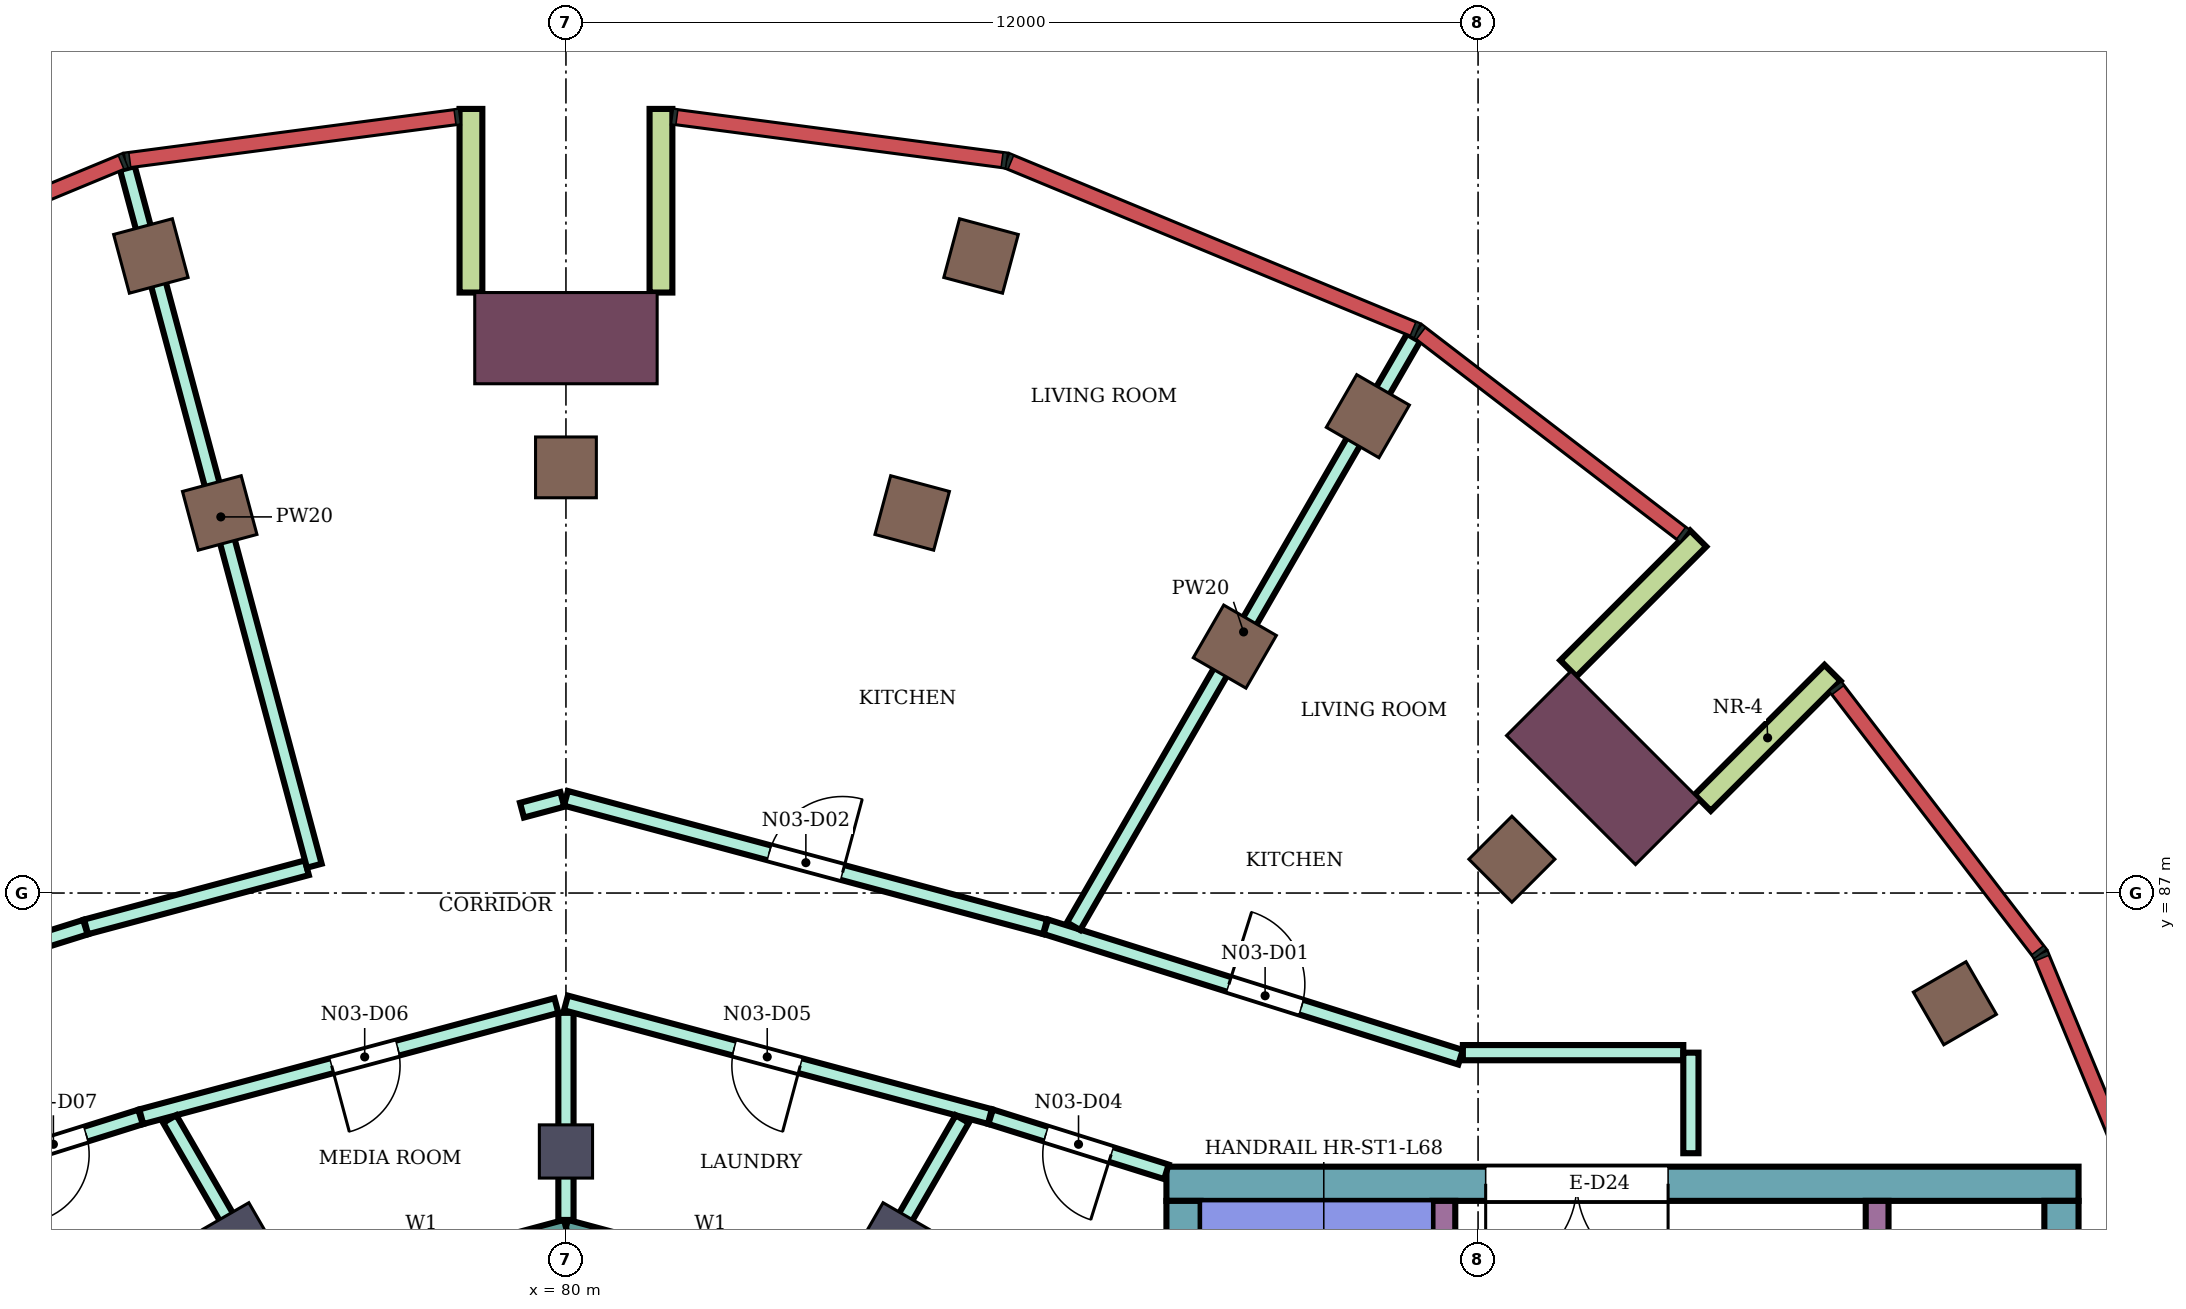
"""IFC4 building model, lengths in metres.
Left out: names, types, materials, properties, quantities, classifications, styles, units other than length and angle.
Written with IfcOpenShell. Run it as: python <this file> out.ifc"""

import sys

from ifc_helpers import new_model, si_unit, direction, frame, frame_2d, origin, origin_2d, place, context, subcontext, project, spatial, rectangle, extrude, element, fill, save


model = new_model("IFC4")
c1 = context("Model", 3, precision=1e-05, world=origin(), true_north=direction((0.0, 1.0)))
c2 = subcontext(c1, "Body", "Model", "MODEL_VIEW")
j1 = project(units=[si_unit("LENGTHUNIT", "METRE"), si_unit("PLANEANGLEUNIT", "RADIAN")], contexts=[c1])
p1 = place(None, origin())
s1 = spatial("IfcSite", under=j1, at=p1, CompositionType="ELEMENT")
p2 = place(p1, origin())
s2 = spatial("IfcBuilding", under=s1, at=p2, CompositionType="ELEMENT")
p3 = place(p2, frame((0.0, 0.0, 296.7)))
s3 = spatial("IfcBuildingStorey", under=s2, at=p3, CompositionType="ELEMENT", Elevation=296.7)
for number, where, z_axis, x_axis in (
    (1, (98.273, 85.55, 0.0), (0.0, 0.0, 1.0), (0.866, 0.5, 0.0)),
    (2, (90.55, 93.273, 0.0), (0.0, 0.0, 1.0), (0.5, 0.866, 0.0)),
    (3, (85.461, 95.381, 0.0), (0.0, 0.0, 1.0), (0.259, 0.966, 0.0)),
    (4, (74.539, 95.381, 0.0), (0.0, 0.0, 1.0), (-0.259, 0.966, 0.0)),
    (5, (92.445, 87.445, 0.0), (0.0, 0.0, 1.0), (0.707, 0.707, 0.0)),
    (6, (88.8, 90.242, 0.0), (0.0, 0.0, 1.0), (0.5, 0.866, 0.0)),
    (7, (84.555, 92.0, 0.0), (0.0, 0.0, 1.0), (0.259, 0.966, 0.0)),
    (8, (80.0, 92.6, 0.0), (0.0, 0.0, 1.0), (0.0, 1.0, 0.0)),
    (9, (75.445, 92.0, 0.0), (0.0, 0.0, 1.0), (-0.259, 0.966, 0.0)),
):
    element("IfcColumn", number, at=place(p3, frame(where, z_axis=z_axis, x_axis=x_axis)), inside=s3, PredefinedType="COLUMN", context=c2, shape_type="SweptSolid", body=[
        extrude(rectangle(XDim=0.8, YDim=0.8, at=origin_2d()), origin(), (0.0, 0.0, 1.0), 4.2),
    ])
for number, where, z_axis, x_axis in (
    (10, (84.3, 82.448, 0.0), (0.0, 0.0, 1.0), (0.5, 0.866, 0.0)),
    (11, (80.0, 83.6, 0.0), (0.0, 0.0, 1.0), (0.0, 1.0, 0.0)),
    (12, (75.7, 82.448, 0.0), (0.0, 0.0, 1.0), (-0.5, 0.866, 0.0)),
):
    element("IfcColumn", number, at=place(p3, frame(where, z_axis=z_axis, x_axis=x_axis)), inside=s3, PredefinedType="COLUMN", context=c2, shape_type="SweptSolid", body=[
        extrude(rectangle(XDim=0.7, YDim=0.7, at=origin_2d()), origin(), (0.0, 0.0, 1.0), 4.2),
    ])
for number, where, z_axis, x_axis in (
    (13, (93.647, 88.647, 0.0), (0.0, 0.0, 1.0), (0.707, 0.707, 0.0)),
    (14, (80.0, 94.3, 0.0), (0.0, 0.0, 1.0), (0.0, 1.0, 0.0)),
):
    element("IfcColumn", number, at=place(p3, frame(where, z_axis=z_axis, x_axis=x_axis)), inside=s3, PredefinedType="COLUMN", context=c2, shape_type="SweptSolid", body=[
        extrude(rectangle(XDim=1.2, YDim=2.4, at=origin_2d()), origin(), (0.0, 0.0, 1.0), 4.2),
    ])
p4 = place(p3, frame((87.9, 83.175, 0.0), z_axis=(0.0, 0.0, 1.0), x_axis=(1.0, 0.0, 0.0)))
e15 = element("IfcWall", 15, at=p4, inside=s3, PredefinedType="SHEAR", context=c2, shape_type="SweptSolid", body=[
    extrude(rectangle(XDim=12.0, YDim=0.45, at=frame_2d((6.0, 0.0))), origin(), (0.0, 0.0, 1.0), 3.88),
])
p5 = place(p4, frame((4.2, 0.0, 0.0)))
e16 = element("IfcOpeningElement", 16, at=p5, cuts=e15, PredefinedType="OPENING", context=c2, shape_type="SweptSolid", body=[
    extrude(rectangle(XDim=2.4, YDim=2.4, at=frame_2d((1.2, 1.2))), frame((0.0, 0.235, 0.0), z_axis=(0.0, -1.0, 0.0), x_axis=(1.0, 0.0, 0.0)), (0.0, 0.0, 1.0), 0.47),
])
p6 = place(p3, frame((88.125, 75.0, 0.0), z_axis=(0.0, 0.0, 1.0), x_axis=(0.0, 1.0, 0.0)))
e17 = element("IfcWall", 17, at=p6, inside=s3, PredefinedType="SHEAR", context=c2, shape_type="SweptSolid", body=[
    extrude(rectangle(XDim=7.95, YDim=0.45, at=frame_2d((3.975, 0.0))), origin(), (0.0, 0.0, 1.0), 3.88),
])
p7 = place(p3, frame((99.675, 73.6, 0.0), z_axis=(0.0, 0.0, 1.0), x_axis=(0.0, 1.0, 0.0)))
e18 = element("IfcWall", 18, at=p7, inside=s3, PredefinedType="SHEAR", context=c2, shape_type="SweptSolid", body=[
    extrude(rectangle(XDim=9.35, YDim=0.45, at=frame_2d((4.675, 0.0))), origin(), (0.0, 0.0, 1.0), 3.88),
])
p8 = place(p3, frame((91.55, 75.0, 0.0), z_axis=(0.0, 0.0, 1.0), x_axis=(0.0, 1.0, 0.0)))
e19 = element("IfcWall", 19, at=p8, inside=s3, PredefinedType="SHEAR", context=c2, shape_type="SweptSolid", body=[
    extrude(rectangle(XDim=7.95, YDim=0.3, at=frame_2d((3.975, 0.0))), origin(), (0.0, 0.0, 1.0), 3.88),
])
p9 = place(p8, frame((1.85, 0.0, 0.0)))
e20 = element("IfcOpeningElement", 20, at=p9, cuts=e19, PredefinedType="OPENING", context=c2, shape_type="SweptSolid", body=[
    extrude(rectangle(XDim=0.9, YDim=2.1, at=frame_2d((0.45, 1.05))), frame((0.0, 0.16, 0.0), z_axis=(0.0, -1.0, 0.0), x_axis=(1.0, 0.0, 0.0)), (0.0, 0.0, 1.0), 0.32),
])
p10 = place(p3, frame((97.25, 80.05, 0.0), z_axis=(0.0, 0.0, 1.0), x_axis=(0.0, 1.0, 0.0)))
e21 = element("IfcWall", 21, at=p10, inside=s3, PredefinedType="SHEAR", context=c2, shape_type="SweptSolid", body=[
    extrude(rectangle(XDim=2.9, YDim=0.3, at=frame_2d((1.45, 0.0))), origin(), (0.0, 0.0, 1.0), 3.88),
])
for number, where, z_axis, x_axis in (
    (22, (94.955, 88.188, 0.0), (0.0, 0.0, 1.0), (0.707, 0.707, 0.0)),
    (23, (93.188, 89.955, 0.0), (0.0, 0.0, 1.0), (0.707, 0.707, 0.0)),
    (24, (81.25, 94.9, 0.0), (0.0, 0.0, 1.0), (0.0, 1.0, 0.0)),
    (25, (78.75, 94.9, 0.0), (0.0, 0.0, 1.0), (0.0, 1.0, 0.0)),
):
    element("IfcWall", number, at=place(p3, frame(where, z_axis=z_axis, x_axis=x_axis)), inside=s3, PredefinedType="NOTDEFINED", context=c2, shape_type="SweptSolid", body=[
        extrude(rectangle(XDim=2.416, YDim=0.3, at=frame_2d((1.208, 0.0))), origin(), (0.0, 0.0, 1.0), 4.2),
    ])
p11 = place(p3, frame((83.802, 81.585, 0.0), z_axis=(0.0, 0.0, 1.0), x_axis=(-0.965933654434, 0.258789828301, 0.0)))
e26 = element("IfcWall", 26, at=p11, inside=s3, PredefinedType="NOTDEFINED", context=c2, shape_type="SweptSolid", body=[
    extrude(rectangle(XDim=3.936, YDim=0.2, at=frame_2d((1.968, 0.0))), origin(), (0.0, 0.0, 1.0), 4.2),
])
p12 = place(p11, frame((0.468, 0.0, 0.9)))
e27 = element("IfcOpeningElement", 27, at=p12, cuts=e26, PredefinedType="OPENING", context=c2, shape_type="SweptSolid", body=[
    extrude(rectangle(XDim=3.0, YDim=2.3, at=frame_2d((1.5, 1.15))), frame((0.0, 0.11, 0.0), z_axis=(0.0, -1.0, 0.0), x_axis=(1.0, 0.0, 0.0)), (0.0, 0.0, 1.0), 0.22),
])
p13 = place(p3, frame((80.0, 82.604, 0.0), z_axis=(0.0, 0.0, 1.0), x_axis=(-0.965933654434, -0.258789828301, 0.0)))
e28 = element("IfcWall", 28, at=p13, inside=s3, PredefinedType="NOTDEFINED", context=c2, shape_type="SweptSolid", body=[
    extrude(rectangle(XDim=3.936, YDim=0.2, at=frame_2d((1.968, 0.0))), origin(), (0.0, 0.0, 1.0), 4.2),
])
p14 = place(p13, frame((0.468, 0.0, 0.9)))
e29 = element("IfcOpeningElement", 29, at=p14, cuts=e28, PredefinedType="OPENING", context=c2, shape_type="SweptSolid", body=[
    extrude(rectangle(XDim=3.0, YDim=2.3, at=frame_2d((1.5, 1.15))), frame((0.0, 0.11, 0.0), z_axis=(0.0, -1.0, 0.0), x_axis=(1.0, 0.0, 0.0)), (0.0, 0.0, 1.0), 0.22),
])
p15 = place(p3, frame((68.201, 84.833, 0.0), z_axis=(0.0, 0.0, 1.0), x_axis=(0.95420102455, 0.299166182492, 0.0)))
e30 = element("IfcWall", 30, at=p15, inside=s3, PredefinedType="PARTITIONING", context=c2, shape_type="SweptSolid", body=[
    extrude(rectangle(XDim=5.74, YDim=0.2, at=frame_2d((2.87, 0.0))), origin(), (0.0, 0.0, 1.0), 3.75),
])
p16 = place(p15, frame((2.374, 0.0, 0.0)))
e31 = element("IfcOpeningElement", 31, at=p16, cuts=e30, PredefinedType="OPENING", context=c2, shape_type="SweptSolid", body=[
    extrude(rectangle(XDim=1.0, YDim=2.1, at=frame_2d((0.5, 1.05))), frame((0.0, 0.11, 0.0), z_axis=(0.0, -1.0, 0.0), x_axis=(1.0, 0.0, 0.0)), (0.0, 0.0, 1.0), 0.22),
])
p17 = place(p3, frame((72.1, 83.332, 0.0), z_axis=(0.0, 0.0, 1.0), x_axis=(0.954233106619, 0.299063836383, 0.0)))
e32 = element("IfcWall", 32, at=p17, inside=s3, PredefinedType="PARTITIONING", context=c2, shape_type="SweptSolid", body=[
    extrude(rectangle(XDim=2.414, YDim=0.2, at=frame_2d((1.207, 0.0))), origin(), (0.0, 0.0, 1.0), 3.75),
])
p18 = place(p17, frame((0.762, 0.0, 0.0)))
e33 = element("IfcOpeningElement", 33, at=p18, cuts=e32, PredefinedType="OPENING", context=c2, shape_type="SweptSolid", body=[
    extrude(rectangle(XDim=0.9, YDim=2.1, at=frame_2d((0.45, 1.05))), frame((0.0, 0.11, 0.0), z_axis=(0.0, -1.0, 0.0), x_axis=(1.0, 0.0, 0.0)), (0.0, 0.0, 1.0), 0.22),
])
p19 = place(p3, frame((73.687, 86.555, 0.0), z_axis=(0.0, 0.0, 1.0), x_axis=(0.965987897826, 0.258587279759, 0.0)))
e34 = element("IfcWall", 34, at=p19, inside=s3, PredefinedType="PARTITIONING", context=c2, shape_type="SweptSolid", body=[
    extrude(rectangle(XDim=3.007, YDim=0.2, at=frame_2d((1.503, 0.0))), origin(), (0.0, 0.0, 1.0), 3.75),
])
p20 = place(p3, frame((74.23, 96.538, 0.0), z_axis=(0.0, 0.0, 1.0), x_axis=(0.258775468547, -0.965937501538, 0.0)))
e35 = element("IfcWall", 35, at=p20, inside=s3, PredefinedType="PARTITIONING", context=c2, shape_type="SweptSolid", body=[
    extrude(rectangle(XDim=9.502, YDim=0.2, at=frame_2d((4.751, 0.0))), origin(), (0.0, 0.0, 1.0), 3.75),
])
p21 = place(p3, frame((74.413, 84.057, 0.0), z_axis=(0.0, 0.0, 1.0), x_axis=(0.965972135939, 0.258646153246, 0.0)))
e36 = element("IfcWall", 36, at=p21, inside=s3, PredefinedType="PARTITIONING", context=c2, shape_type="SweptSolid", body=[
    extrude(rectangle(XDim=5.654, YDim=0.2, at=frame_2d((2.827, 0.0))), origin(), (0.0, 0.0, 1.0), 3.75),
])
p22 = place(p21, frame((2.593, 0.0, 0.0)))
e37 = element("IfcOpeningElement", 37, at=p22, cuts=e36, PredefinedType="OPENING", context=c2, shape_type="SweptSolid", body=[
    extrude(rectangle(XDim=0.9, YDim=2.1, at=frame_2d((0.45, 1.05))), frame((0.0, 0.11, 0.0), z_axis=(0.0, -1.0, 0.0), x_axis=(1.0, 0.0, 0.0)), (0.0, 0.0, 1.0), 0.22),
])
p23 = place(p3, frame((74.787, 84.027, 0.0), z_axis=(0.0, 0.0, 1.0), x_axis=(0.500079107518, -0.86597972622, 0.0)))
e38 = element("IfcWall", 38, at=p23, inside=s3, PredefinedType="PARTITIONING", context=c2, shape_type="SweptSolid", body=[
    extrude(rectangle(XDim=2.726, YDim=0.2, at=frame_2d((1.363, 0.0))), origin(), (0.0, 0.0, 1.0), 3.75),
])
p24 = place(p3, frame((79.421, 88.09, 0.0), z_axis=(0.0, 0.0, 1.0), x_axis=(0.966065016104, 0.258299021793, 0.0)))
e39 = element("IfcWall", 39, at=p24, inside=s3, PredefinedType="PARTITIONING", context=c2, shape_type="SweptSolid", body=[
    extrude(rectangle(XDim=0.549, YDim=0.2, at=frame_2d((0.274, 0.0))), origin(), (0.0, 0.0, 1.0), 3.75),
])
p25 = place(p3, frame((80.0, 82.699, 0.0), z_axis=(0.0, 0.0, 1.0), x_axis=(0.0, 1.0, 0.0)))
e40 = element("IfcWall", 40, at=p25, inside=s3, PredefinedType="PARTITIONING", context=c2, shape_type="SweptSolid", body=[
    extrude(rectangle(XDim=2.725, YDim=0.2, at=frame_2d((1.363, 0.0))), origin(), (0.0, 0.0, 1.0), 3.75),
])
p26 = place(p3, frame((80.0, 85.554, 0.0), z_axis=(0.0, 0.0, 1.0), x_axis=(0.965928989968, -0.258807237802, 0.0)))
e41 = element("IfcWall", 41, at=p26, inside=s3, PredefinedType="PARTITIONING", context=c2, shape_type="SweptSolid", body=[
    extrude(rectangle(XDim=5.774, YDim=0.2, at=frame_2d((2.887, 0.0))), origin(), (0.0, 0.0, 1.0), 3.75),
])
p27 = place(p26, frame((2.292, 0.0, 0.0)))
e42 = element("IfcOpeningElement", 42, at=p27, cuts=e41, PredefinedType="OPENING", context=c2, shape_type="SweptSolid", body=[
    extrude(rectangle(XDim=0.9, YDim=2.1, at=frame_2d((0.45, 1.05))), frame((0.0, 0.11, 0.0), z_axis=(0.0, -1.0, 0.0), x_axis=(1.0, 0.0, 0.0)), (0.0, 0.0, 1.0), 0.22),
])
p28 = place(p3, frame((80.0, 88.246, 0.0), z_axis=(0.0, 0.0, 1.0), x_axis=(0.965856994925, -0.259075790752, 0.0)))
e43 = element("IfcWall", 43, at=p28, inside=s3, PredefinedType="PARTITIONING", context=c2, shape_type="SweptSolid", body=[
    extrude(rectangle(XDim=6.526, YDim=0.2, at=frame_2d((3.263, 0.0))), origin(), (0.0, 0.0, 1.0), 3.75),
])
p29 = place(p28, frame((2.768, 0.0, 0.0)))
e44 = element("IfcOpeningElement", 44, at=p29, cuts=e43, PredefinedType="OPENING", context=c2, shape_type="SweptSolid", body=[
    extrude(rectangle(XDim=1.0, YDim=2.1, at=frame_2d((0.5, 1.05))), frame((0.0, 0.11, 0.0), z_axis=(0.0, -1.0, 0.0), x_axis=(1.0, 0.0, 0.0)), (0.0, 0.0, 1.0), 0.22),
])
p30 = place(p3, frame((83.851, 81.666, 0.0), z_axis=(0.0, 0.0, 1.0), x_axis=(0.500146274735, 0.865940935554, 0.0)))
e45 = element("IfcWall", 45, at=p30, inside=s3, PredefinedType="PARTITIONING", context=c2, shape_type="SweptSolid", body=[
    extrude(rectangle(XDim=2.726, YDim=0.2, at=frame_2d((1.363, 0.0))), origin(), (0.0, 0.0, 1.0), 3.75),
])
p31 = place(p3, frame((85.587, 84.057, 0.0), z_axis=(0.0, 0.0, 1.0), x_axis=(0.954239513179, -0.299043393987, 0.0)))
e46 = element("IfcWall", 46, at=p31, inside=s3, PredefinedType="PARTITIONING", context=c2, shape_type="SweptSolid", body=[
    extrude(rectangle(XDim=2.424, YDim=0.2, at=frame_2d((1.212, 0.0))), origin(), (0.0, 0.0, 1.0), 3.75),
])
p32 = place(p31, frame((0.762, 0.0, 0.0)))
e47 = element("IfcOpeningElement", 47, at=p32, cuts=e46, PredefinedType="OPENING", context=c2, shape_type="SweptSolid", body=[
    extrude(rectangle(XDim=0.9, YDim=2.1, at=frame_2d((0.45, 1.05))), frame((0.0, 0.11, 0.0), z_axis=(0.0, -1.0, 0.0), x_axis=(1.0, 0.0, 0.0)), (0.0, 0.0, 1.0), 0.22),
])
p33 = place(p3, frame((86.314, 86.556, 0.0), z_axis=(0.0, 0.0, 1.0), x_axis=(0.953912400139, -0.300085209334, 0.0)))
e48 = element("IfcWall", 48, at=p33, inside=s3, PredefinedType="PARTITIONING", context=c2, shape_type="SweptSolid", body=[
    extrude(rectangle(XDim=5.719, YDim=0.2, at=frame_2d((2.86, 0.0))), origin(), (0.0, 0.0, 1.0), 3.75),
])
p34 = place(p33, frame((2.524, 0.0, 0.0)))
e49 = element("IfcOpeningElement", 49, at=p34, cuts=e48, PredefinedType="OPENING", context=c2, shape_type="SweptSolid", body=[
    extrude(rectangle(XDim=1.0, YDim=2.1, at=frame_2d((0.5, 1.05))), frame((0.0, 0.11, 0.0), z_axis=(0.0, -1.0, 0.0), x_axis=(1.0, 0.0, 0.0)), (0.0, 0.0, 1.0), 0.22),
])
p35 = place(p3, frame((86.679, 86.563, 0.0), z_axis=(0.0, 0.0, 1.0), x_axis=(0.500152516677, 0.865937330331, 0.0)))
e50 = element("IfcWall", 50, at=p35, inside=s3, PredefinedType="PARTITIONING", context=c2, shape_type="SweptSolid", body=[
    extrude(rectangle(XDim=8.943, YDim=0.2, at=frame_2d((4.472, 0.0))), origin(), (0.0, 0.0, 1.0), 3.75),
])
p36 = place(p3, frame((91.8, 84.9, 0.0), z_axis=(0.0, 0.0, 1.0), x_axis=(1.0, 0.0, 0.0)))
e51 = element("IfcWall", 51, at=p36, inside=s3, PredefinedType="PARTITIONING", context=c2, shape_type="SweptSolid", body=[
    extrude(rectangle(XDim=2.9, YDim=0.2, at=frame_2d((1.45, 0.0))), origin(), (0.0, 0.0, 1.0), 3.75),
])
p37 = place(p3, frame((94.8, 83.577, 0.0), z_axis=(0.0, 0.0, 1.0), x_axis=(0.0, 1.0, 0.0)))
e52 = element("IfcWall", 52, at=p37, inside=s3, PredefinedType="PARTITIONING", context=c2, shape_type="SweptSolid", body=[
    extrude(rectangle(XDim=1.323, YDim=0.2, at=frame_2d((0.662, 0.0))), origin(), (0.0, 0.0, 1.0), 3.75),
])
p38 = place(p34, origin())
e53 = element("IfcDoor", 53, at=p38, inside=s3, OperationType="SINGLE_SWING_LEFT", PredefinedType="DOOR", context=c2, shape_type="SweptSolid", body=[
    extrude(rectangle(XDim=1.0, YDim=2.1, at=frame_2d((0.5, 1.05))), frame((0.0, 0.025, 0.0), z_axis=(0.0, -1.0, 0.0), x_axis=(1.0, 0.0, 0.0)), (0.0, 0.0, 1.0), 0.05),
])
fill(e49, e53)
p39 = place(p29, origin())
e54 = element("IfcDoor", 54, at=p39, inside=s3, OperationType="SINGLE_SWING_RIGHT", PredefinedType="DOOR", context=c2, shape_type="SweptSolid", body=[
    extrude(rectangle(XDim=1.0, YDim=2.1, at=frame_2d((0.5, 1.05))), frame((0.0, 0.025, 0.0), z_axis=(0.0, -1.0, 0.0), x_axis=(1.0, 0.0, 0.0)), (0.0, 0.0, 1.0), 0.05),
])
fill(e44, e54)
p40 = place(p32, frame((0.9, 0.0, 0.0), z_axis=(0.0, 0.0, 1.0), x_axis=(-1.0, 0.0, 0.0)))
e55 = element("IfcDoor", 55, at=p40, inside=s3, OperationType="SINGLE_SWING_LEFT", PredefinedType="DOOR", context=c2, shape_type="SweptSolid", body=[
    extrude(rectangle(XDim=0.9, YDim=2.1, at=frame_2d((0.45, 1.05))), frame((0.0, 0.025, 0.0), z_axis=(0.0, -1.0, 0.0), x_axis=(1.0, 0.0, 0.0)), (0.0, 0.0, 1.0), 0.05),
])
fill(e47, e55)
p41 = place(p27, frame((0.9, 0.0, 0.0), z_axis=(0.0, 0.0, 1.0), x_axis=(-1.0, 0.0, 0.0)))
e56 = element("IfcDoor", 56, at=p41, inside=s3, OperationType="SINGLE_SWING_LEFT", PredefinedType="DOOR", context=c2, shape_type="SweptSolid", body=[
    extrude(rectangle(XDim=0.9, YDim=2.1, at=frame_2d((0.45, 1.05))), frame((0.0, 0.025, 0.0), z_axis=(0.0, -1.0, 0.0), x_axis=(1.0, 0.0, 0.0)), (0.0, 0.0, 1.0), 0.05),
])
fill(e42, e56)
p42 = place(p22, frame((0.9, 0.0, 0.0), z_axis=(0.0, 0.0, 1.0), x_axis=(-1.0, 0.0, 0.0)))
e57 = element("IfcDoor", 57, at=p42, inside=s3, OperationType="SINGLE_SWING_RIGHT", PredefinedType="DOOR", context=c2, shape_type="SweptSolid", body=[
    extrude(rectangle(XDim=0.9, YDim=2.1, at=frame_2d((0.45, 1.05))), frame((0.0, 0.025, 0.0), z_axis=(0.0, -1.0, 0.0), x_axis=(1.0, 0.0, 0.0)), (0.0, 0.0, 1.0), 0.05),
])
fill(e37, e57)
p43 = place(p18, frame((0.9, 0.0, 0.0), z_axis=(0.0, 0.0, 1.0), x_axis=(-1.0, 0.0, 0.0)))
e58 = element("IfcDoor", 58, at=p43, inside=s3, OperationType="SINGLE_SWING_RIGHT", PredefinedType="DOOR", context=c2, shape_type="SweptSolid", body=[
    extrude(rectangle(XDim=0.9, YDim=2.1, at=frame_2d((0.45, 1.05))), frame((0.0, 0.025, 0.0), z_axis=(0.0, -1.0, 0.0), x_axis=(1.0, 0.0, 0.0)), (0.0, 0.0, 1.0), 0.05),
])
fill(e33, e58)
p44 = place(p5, frame((2.4, 0.0, 0.0), z_axis=(0.0, 0.0, 1.0), x_axis=(-1.0, 0.0, 0.0)))
e59 = element("IfcDoor", 59, at=p44, inside=s3, OperationType="DOUBLE_DOOR_SINGLE_SWING", PredefinedType="DOOR", context=c2, shape_type="SweptSolid", body=[
    extrude(rectangle(XDim=2.4, YDim=2.4, at=frame_2d((1.2, 1.2))), frame((0.0, 0.025, 0.0), z_axis=(0.0, -1.0, 0.0), x_axis=(1.0, 0.0, 0.0)), (0.0, 0.0, 1.0), 0.05),
])
fill(e16, e59)
save(model, sys.argv[1])
